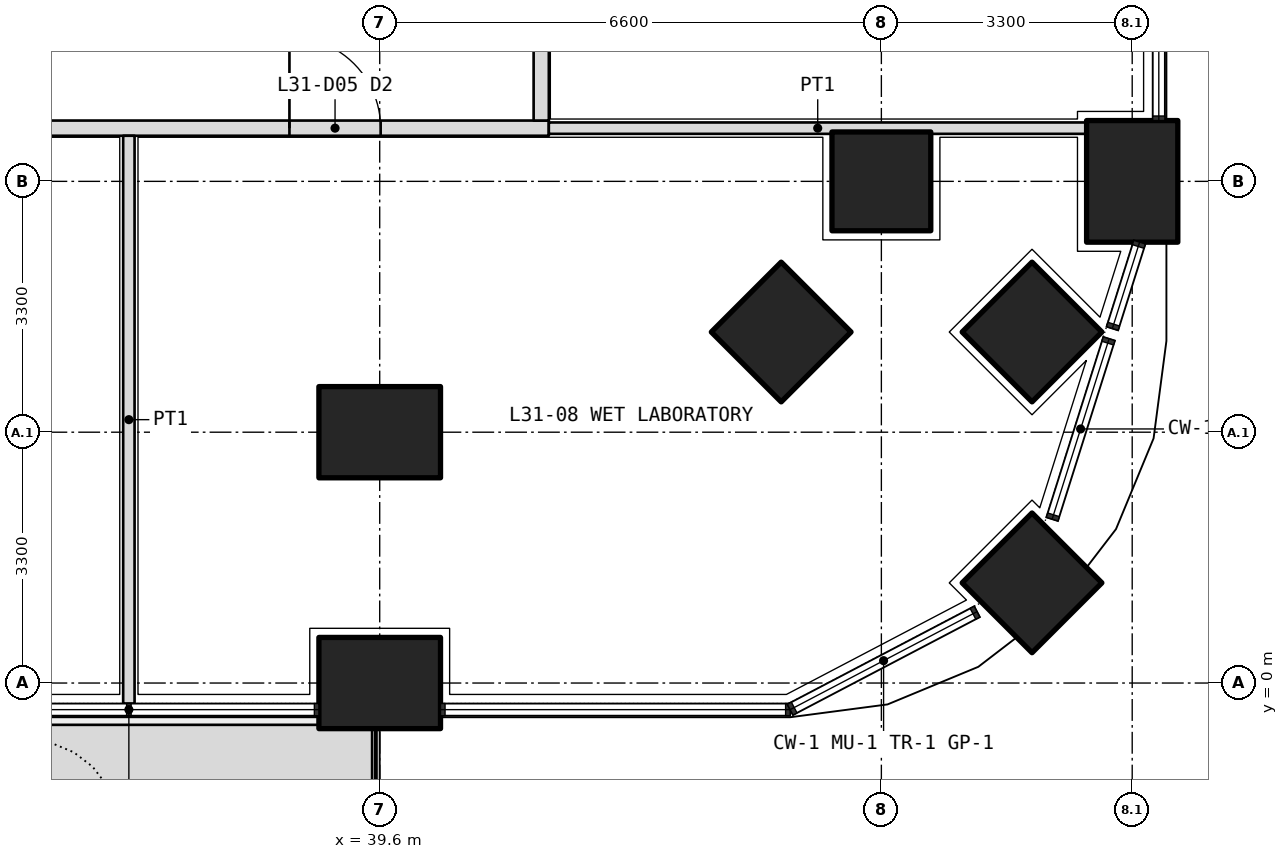
"""IFC4 building model, lengths in metres.
Left out: names, types, materials, properties, quantities, classifications, styles, units other than length and angle.
Written with IfcOpenShell. Run it as: python <this file> out.ifc"""

import sys

from ifc_helpers import new_model, si_unit, direction, frame, frame_2d, origin, origin_2d, place, context, subcontext, project, spatial, polyline, rectangle, outline, extrude, element, fill, save


model = new_model("IFC4")
c1 = context("Model", 3, precision=1e-05, world=origin(), true_north=direction((0.0, 1.0)))
c2 = subcontext(c1, "Body", "Model", "MODEL_VIEW")
j1 = project(units=[si_unit("LENGTHUNIT", "METRE"), si_unit("PLANEANGLEUNIT", "RADIAN")], contexts=[c1])
p1 = place(None, origin())
s1 = spatial("IfcSite", under=j1, at=p1, CompositionType="ELEMENT")
p2 = place(p1, origin())
s2 = spatial("IfcBuilding", under=s1, at=p2, CompositionType="ELEMENT")
p3 = place(p2, frame((0.0, 0.0, 136.8)))
s3 = spatial("IfcBuildingStorey", under=s2, at=p3, CompositionType="ELEMENT", Elevation=136.8)
p4 = place(p3, frame((48.182, 1.318, 0.0), z_axis=(0.0, 0.0, 1.0), x_axis=(0.707106781187, 0.707106781187, 0.0)))
e1 = element("IfcColumn", 1, at=p4, inside=s3, PredefinedType="COLUMN", context=c2, shape_type="SweptSolid", body=[
    extrude(rectangle(XDim=1.3, YDim=1.3, at=origin_2d()), origin(), (0.0, 0.0, 1.0), 4.2),
])
for number, where, z_axis, x_axis in (
    (2, (39.6, 0.0, 0.0), (0.0, 0.0, 1.0), (1.0, 0.0, 0.0)),
    (3, (49.5, 6.6, 0.0), (0.0, 0.0, 1.0), (0.0, 1.0, 0.0)),
):
    element("IfcColumn", number, at=place(p3, frame(where, z_axis=z_axis, x_axis=x_axis)), inside=s3, PredefinedType="COLUMN", context=c2, shape_type="SweptSolid", body=[
        extrude(rectangle(XDim=1.6, YDim=1.2, at=origin_2d()), origin(), (0.0, 0.0, 1.0), 4.2),
    ])
for number, where, z_axis, x_axis in (
    (4, (46.2, 6.6, 0.0), (0.0, 0.0, 1.0), (1.0, 0.0, 0.0)),
    (5, (48.182, 4.618, 0.0), (0.0, 0.0, 1.0), (0.707, 0.707, 0.0)),
):
    element("IfcColumn", number, at=place(p3, frame(where, z_axis=z_axis, x_axis=x_axis)), inside=s3, PredefinedType="COLUMN", context=c2, shape_type="SweptSolid", body=[
        extrude(rectangle(XDim=1.3, YDim=1.3, at=origin_2d()), origin(), (0.0, 0.0, 1.0), 4.2),
    ])
p5 = place(p3, frame((39.6, 3.3, 0.0), z_axis=(0.0, 0.0, 1.0), x_axis=(1.0, 0.0, 0.0)))
e6 = element("IfcColumn", 6, at=p5, inside=s3, PredefinedType="COLUMN", context=c2, shape_type="SweptSolid", body=[
    extrude(rectangle(XDim=1.6, YDim=1.2, at=origin_2d()), origin(), (0.0, 0.0, 1.0), 4.2),
])
p6 = place(p3, frame((44.882, 4.618, 0.0), z_axis=(0.0, 0.0, 1.0), x_axis=(0.707106781187, 0.707106781187, 0.0)))
e7 = element("IfcColumn", 7, at=p6, inside=s3, PredefinedType="COLUMN", context=c2, shape_type="SweptSolid", body=[
    extrude(rectangle(XDim=1.3, YDim=1.3, at=origin_2d()), origin(), (0.0, 0.0, 1.0), 4.2),
])
p7 = place(p3, origin())
e8 = element("IfcWall", 8, at=p7, inside=s3, PredefinedType="USERDEFINED", context=c2, shape_type="SweptSolid", body=[
    extrude(outline(polyline([(30.45, -1.55), (39.5, -1.55), (39.5, -0.55), (30.45, -0.55), (30.45, -1.55)]), holes=[polyline([(30.6, -1.4), (39.35, -1.4), (39.35, -0.7), (30.6, -0.7), (30.6, -1.4)])]), origin(), (0.0, 0.0, 1.0), 1.05),
])
p8 = place(p3, frame((10.975, 7.3, 0.0), z_axis=(0.0, 0.0, 1.0), x_axis=(1.0, 0.0, 0.0)))
e9 = element("IfcWall", 9, at=p8, inside=s3, PredefinedType="PARTITIONING", context=c2, shape_type="SweptSolid", body=[
    extrude(rectangle(XDim=30.85, YDim=0.2, at=frame_2d((15.425, 0.0))), origin(), (0.0, 0.0, 1.0), 2.85),
])
p9 = place(p8, frame((3.962, 0.0, 0.0)))
e10 = element("IfcOpeningElement", 10, at=p9, cuts=e9, PredefinedType="OPENING", context=c2, shape_type="SweptSolid", body=[
    extrude(rectangle(XDim=1.0, YDim=2.1, at=frame_2d((0.5, 1.05))), frame((0.0, 0.11, 0.0), z_axis=(0.0, -1.0, 0.0), x_axis=(1.0, 0.0, 0.0)), (0.0, 0.0, 1.0), 0.22),
])
p10 = place(p8, frame((13.275, 0.0, 0.0)))
e11 = element("IfcOpeningElement", 11, at=p10, cuts=e9, PredefinedType="OPENING", context=c2, shape_type="SweptSolid", body=[
    extrude(rectangle(XDim=1.0, YDim=2.1, at=frame_2d((0.5, 1.05))), frame((0.0, 0.11, 0.0), z_axis=(0.0, -1.0, 0.0), x_axis=(1.0, 0.0, 0.0)), (0.0, 0.0, 1.0), 0.22),
])
p11 = place(p8, frame((21.525, 0.0, 0.0)))
e12 = element("IfcOpeningElement", 12, at=p11, cuts=e9, PredefinedType="OPENING", context=c2, shape_type="SweptSolid", body=[
    extrude(rectangle(XDim=1.0, YDim=2.1, at=frame_2d((0.5, 1.05))), frame((0.0, 0.11, 0.0), z_axis=(0.0, -1.0, 0.0), x_axis=(1.0, 0.0, 0.0)), (0.0, 0.0, 1.0), 0.22),
])
p12 = place(p8, frame((27.438, 0.0, 0.0)))
e13 = element("IfcOpeningElement", 13, at=p12, cuts=e9, PredefinedType="OPENING", context=c2, shape_type="SweptSolid", body=[
    extrude(rectangle(XDim=1.2, YDim=2.1, at=frame_2d((0.6, 1.05))), frame((0.0, 0.11, 0.0), z_axis=(0.0, -1.0, 0.0), x_axis=(1.0, 0.0, 0.0)), (0.0, 0.0, 1.0), 0.22),
])
p13 = place(p3, frame((41.725, 7.4, 0.0), z_axis=(0.0, 0.0, 1.0), x_axis=(0.0, 1.0, 0.0)))
e14 = element("IfcWall", 14, at=p13, inside=s3, PredefinedType="PARTITIONING", context=c2, shape_type="SweptSolid", body=[
    extrude(rectangle(XDim=22.3, YDim=0.2, at=frame_2d((11.15, 0.0))), origin(), (0.0, 0.0, 1.0), 2.85),
])
p14 = place(p13, frame((5.65, 0.0, 0.0)))
e15 = element("IfcOpeningElement", 15, at=p14, cuts=e14, PredefinedType="OPENING", context=c2, shape_type="SweptSolid", body=[
    extrude(rectangle(XDim=1.0, YDim=2.1, at=frame_2d((0.5, 1.05))), frame((0.0, 0.11, 0.0), z_axis=(0.0, -1.0, 0.0), x_axis=(1.0, 0.0, 0.0)), (0.0, 0.0, 1.0), 0.22),
])
p15 = place(p13, frame((13.5, 0.0, 0.0)))
e16 = element("IfcOpeningElement", 16, at=p15, cuts=e14, PredefinedType="OPENING", context=c2, shape_type="SweptSolid", body=[
    extrude(rectangle(XDim=1.0, YDim=2.1, at=frame_2d((0.5, 1.05))), frame((0.0, 0.11, 0.0), z_axis=(0.0, -1.0, 0.0), x_axis=(1.0, 0.0, 0.0)), (0.0, 0.0, 1.0), 0.22),
])
p16 = place(p13, frame((16.85, 0.0, 0.0)))
e17 = element("IfcOpeningElement", 17, at=p16, cuts=e14, PredefinedType="OPENING", context=c2, shape_type="SweptSolid", body=[
    extrude(rectangle(XDim=0.9, YDim=2.1, at=frame_2d((0.45, 1.05))), frame((0.0, 0.11, 0.0), z_axis=(0.0, -1.0, 0.0), x_axis=(1.0, 0.0, 0.0)), (0.0, 0.0, 1.0), 0.22),
])
p17 = place(p13, frame((20.15, 0.0, 0.0)))
e18 = element("IfcOpeningElement", 18, at=p17, cuts=e14, PredefinedType="OPENING", context=c2, shape_type="SweptSolid", body=[
    extrude(rectangle(XDim=1.0, YDim=2.1, at=frame_2d((0.5, 1.05))), frame((0.0, 0.11, 0.0), z_axis=(0.0, -1.0, 0.0), x_axis=(1.0, 0.0, 0.0)), (0.0, 0.0, 1.0), 0.22),
])
p18 = place(p3, frame((48.9, 7.3, 0.0), z_axis=(0.0, 0.0, 1.0), x_axis=(-1.0, 0.0, 0.0)))
e19 = element("IfcWall", 19, at=p18, inside=s3, PredefinedType="PARTITIONING", context=c2, shape_type="SweptSolid", body=[
    extrude(rectangle(XDim=7.075, YDim=0.15, at=frame_2d((3.538, 0.0))), origin(), (0.0, 0.0, 1.0), 2.85),
])
p19 = place(p3, frame((36.3, -0.27, 0.0), z_axis=(0.0, 0.0, 1.0), x_axis=(0.0, 1.0, 0.0)))
e20 = element("IfcWall", 20, at=p19, inside=s3, PredefinedType="PARTITIONING", context=c2, shape_type="SweptSolid", body=[
    extrude(rectangle(XDim=7.47, YDim=0.15, at=frame_2d((3.735, 0.0))), origin(), (0.0, 0.0, 1.0), 2.6),
])
p20 = place(p12, origin())
e21 = element("IfcDoor", 21, at=p20, inside=s3, OperationType="DOUBLE_DOOR_SINGLE_SWING", PredefinedType="DOOR", context=c2, shape_type="SweptSolid", body=[
    extrude(rectangle(XDim=1.2, YDim=2.1, at=frame_2d((0.6, 1.05))), frame((0.0, 0.025, 0.0), z_axis=(0.0, -1.0, 0.0), x_axis=(1.0, 0.0, 0.0)), (0.0, 0.0, 1.0), 0.05),
])
fill(e13, e21)
save(model, sys.argv[1])
